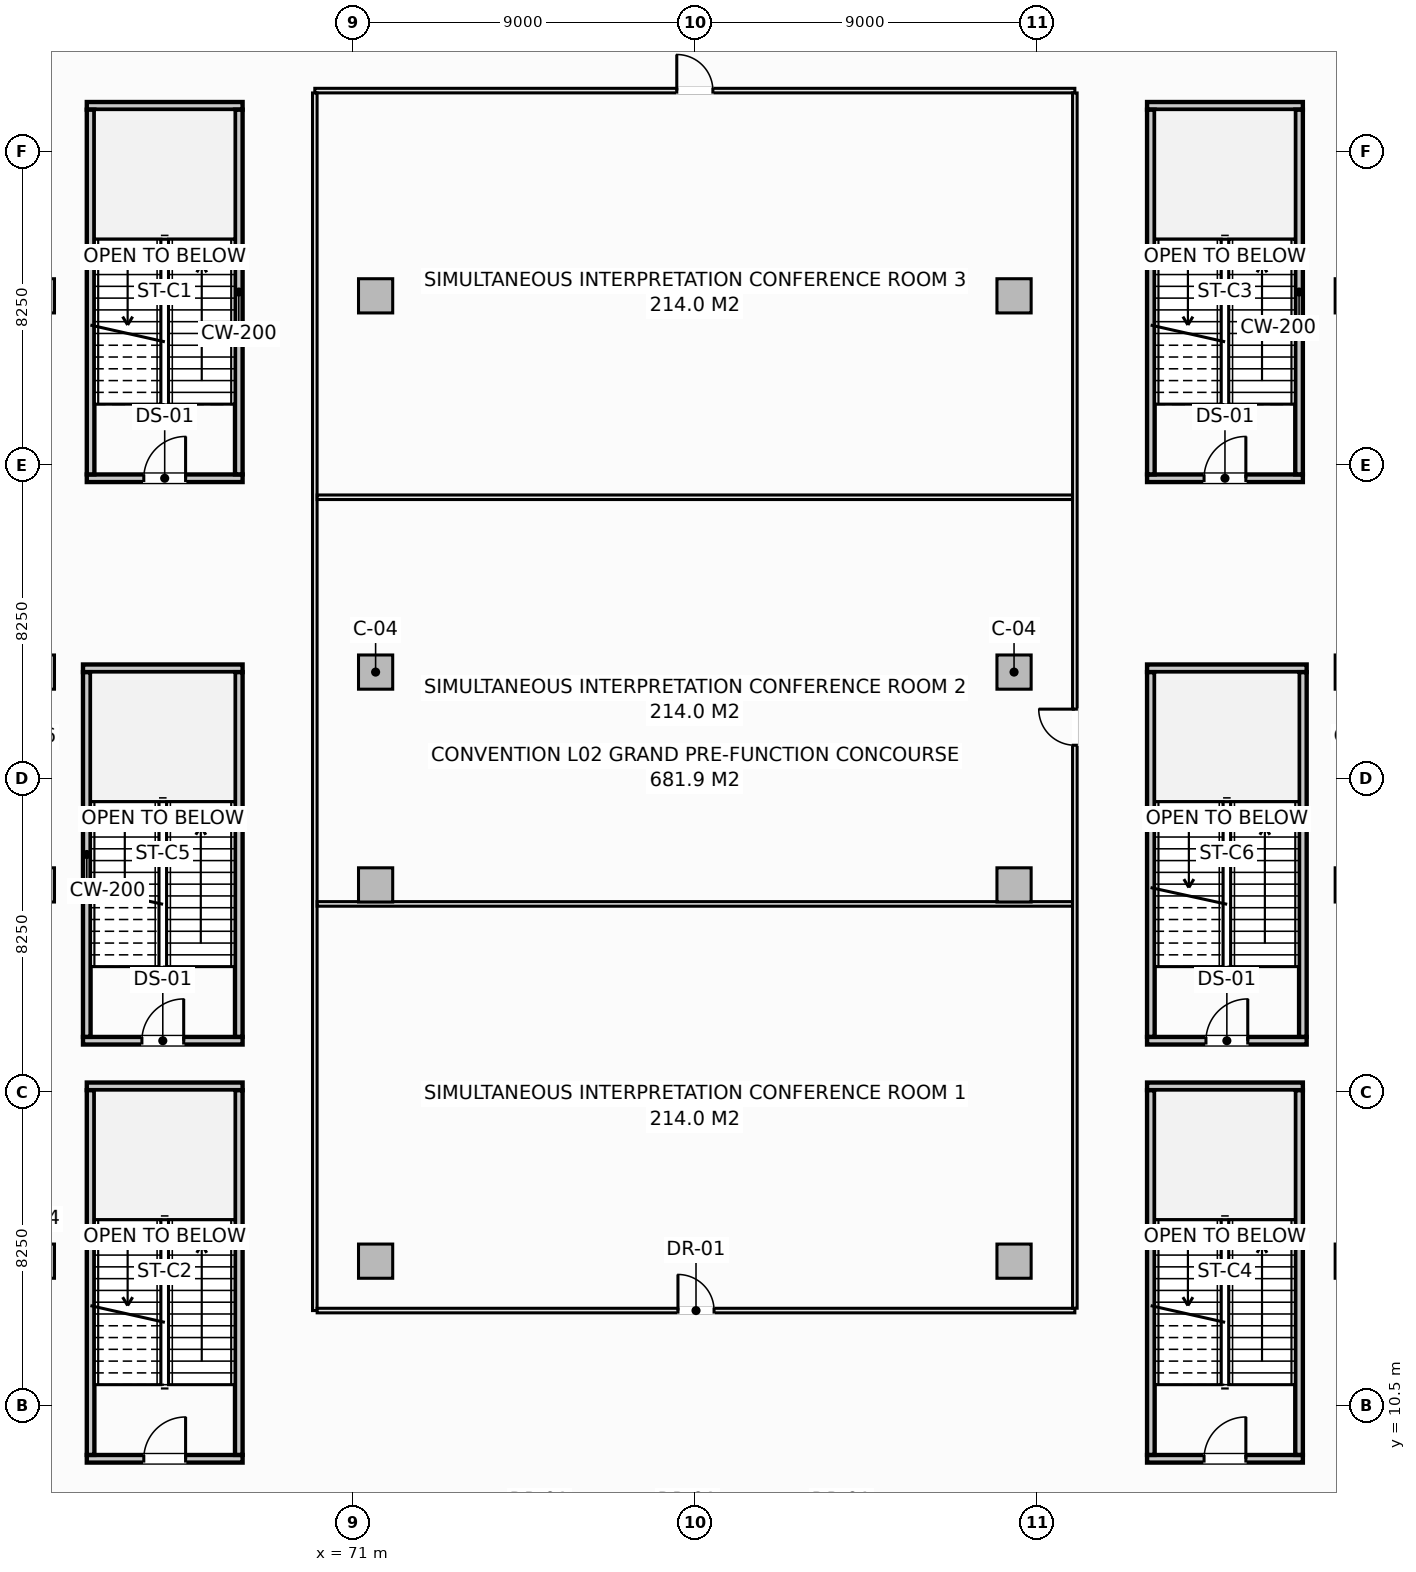
"""IFC4 building model, lengths in metres.
Left out: names, types, materials, properties, quantities, classifications, styles, units other than length and angle.
Written with IfcOpenShell. Run it as: python <this file> out.ifc"""

import sys

from ifc_helpers import new_model, si_unit, direction, frame, frame_2d, origin, origin_2d, place, context, subcontext, project, spatial, rectangle, extrude, element, fill, save


model = new_model("IFC4")
c1 = context("Model", 3, precision=1e-05, world=origin(), true_north=direction((0.0, 1.0)))
c2 = subcontext(c1, "Body", "Model", "MODEL_VIEW")
j1 = project(units=[si_unit("LENGTHUNIT", "METRE"), si_unit("PLANEANGLEUNIT", "RADIAN")], contexts=[c1])
p1 = place(None, origin())
s1 = spatial("IfcSite", under=j1, at=p1, CompositionType="ELEMENT")
p2 = place(p1, origin())
s2 = spatial("IfcBuilding", under=s1, at=p2, CompositionType="ELEMENT")
p3 = place(p2, frame((0.0, 0.0, 10.0)))
s3 = spatial("IfcBuildingStorey", under=s2, at=p3, CompositionType="ELEMENT", Elevation=10.0)
for number, where, z_axis, x_axis in (
    (1, (62.7, 14.3, -0.26), (0.0, 0.0, 1.0), (1.0, 0.0, 0.0)),
    (2, (62.7, 24.2, -0.26), (0.0, 0.0, 1.0), (1.0, 0.0, 0.0)),
    (3, (62.7, 29.8, -0.26), (0.0, 0.0, 1.0), (1.0, 0.0, 0.0)),
    (4, (62.7, 39.7, -0.26), (0.0, 0.0, 1.0), (1.0, 0.0, 0.0)),
    (5, (71.6, 14.3, -0.26), (0.0, 0.0, 1.0), (1.0, 0.0, 0.0)),
    (6, (71.6, 24.2, -0.26), (0.0, 0.0, 1.0), (1.0, 0.0, 0.0)),
    (7, (71.6, 29.8, -0.26), (0.0, 0.0, 1.0), (1.0, 0.0, 0.0)),
    (8, (71.6, 39.7, -0.26), (0.0, 0.0, 1.0), (1.0, 0.0, 0.0)),
    (9, (88.4, 14.3, -0.26), (0.0, 0.0, 1.0), (1.0, 0.0, 0.0)),
    (10, (88.4, 24.2, -0.26), (0.0, 0.0, 1.0), (1.0, 0.0, 0.0)),
    (11, (88.4, 29.8, -0.26), (0.0, 0.0, 1.0), (1.0, 0.0, 0.0)),
    (12, (88.4, 39.7, -0.26), (0.0, 0.0, 1.0), (1.0, 0.0, 0.0)),
    (13, (97.3, 14.3, -0.26), (0.0, 0.0, 1.0), (1.0, 0.0, 0.0)),
    (14, (97.3, 24.2, -0.26), (0.0, 0.0, 1.0), (1.0, 0.0, 0.0)),
    (15, (97.3, 29.8, -0.26), (0.0, 0.0, 1.0), (1.0, 0.0, 0.0)),
    (16, (97.3, 39.7, -0.26), (0.0, 0.0, 1.0), (1.0, 0.0, 0.0)),
):
    element("IfcColumn", number, at=place(p3, frame(where, z_axis=z_axis, x_axis=x_axis)), inside=s3, PredefinedType="COLUMN", context=c2, shape_type="SweptSolid", body=[
        extrude(rectangle(XDim=0.9, YDim=0.9, at=origin_2d()), origin(), (0.0, 0.0, 1.0), 5.02),
    ])
p4 = place(p3, frame((64.0, 34.9, -0.26), z_axis=(0.0, 0.0, 1.0), x_axis=(1.0, 0.0, 0.0)))
e17 = element("IfcWall", 17, at=p4, inside=s3, PredefinedType="SHEAR", context=c2, shape_type="SweptSolid", body=[
    extrude(rectangle(XDim=4.1, YDim=0.2, at=frame_2d((2.05, 0.0))), origin(), (0.0, 0.0, 1.0), 5.02),
])
p5 = place(p4, frame((1.5, 0.0, 0.26)))
e18 = element("IfcOpeningElement", 18, at=p5, cuts=e17, PredefinedType="OPENING", context=c2, shape_type="SweptSolid", body=[
    extrude(rectangle(XDim=1.1, YDim=2.15, at=frame_2d((0.55, 1.075))), frame((0.0, 0.11, 0.0), z_axis=(0.0, -1.0, 0.0), x_axis=(1.0, 0.0, 0.0)), (0.0, 0.0, 1.0), 0.22),
])
p6 = place(p3, frame((64.0, 44.7, -0.26), z_axis=(0.0, 0.0, 1.0), x_axis=(1.0, 0.0, 0.0)))
e19 = element("IfcWall", 19, at=p6, inside=s3, PredefinedType="SHEAR", context=c2, shape_type="SweptSolid", body=[
    extrude(rectangle(XDim=4.1, YDim=0.2, at=frame_2d((2.05, 0.0))), origin(), (0.0, 0.0, 1.0), 5.02),
])
for number, where, z_axis, x_axis in (
    (20, (64.1, 35.002, -0.26), (0.0, 0.0, 1.0), (0.0, 1.0, 0.0)),
    (21, (68.0, 35.002, -0.26), (0.0, 0.0, 1.0), (0.0, 1.0, 0.0)),
):
    element("IfcWall", number, at=place(p3, frame(where, z_axis=z_axis, x_axis=x_axis)), inside=s3, PredefinedType="SHEAR", context=c2, shape_type="SweptSolid", body=[
        extrude(rectangle(XDim=9.596, YDim=0.2, at=frame_2d((4.798, 0.0))), origin(), (0.0, 0.0, 1.0), 5.02),
    ])
p7 = place(p3, frame((64.0, 9.1, -0.26), z_axis=(0.0, 0.0, 1.0), x_axis=(1.0, 0.0, 0.0)))
e22 = element("IfcWall", 22, at=p7, inside=s3, PredefinedType="SHEAR", context=c2, shape_type="SweptSolid", body=[
    extrude(rectangle(XDim=4.1, YDim=0.2, at=frame_2d((2.05, 0.0))), origin(), (0.0, 0.0, 1.0), 5.02),
])
p8 = place(p7, frame((1.5, 0.0, 0.26)))
e23 = element("IfcOpeningElement", 23, at=p8, cuts=e22, PredefinedType="OPENING", context=c2, shape_type="SweptSolid", body=[
    extrude(rectangle(XDim=1.1, YDim=2.15, at=frame_2d((0.55, 1.075))), frame((0.0, 0.11, 0.0), z_axis=(0.0, -1.0, 0.0), x_axis=(1.0, 0.0, 0.0)), (0.0, 0.0, 1.0), 0.22),
])
p9 = place(p3, frame((64.0, 18.9, -0.26), z_axis=(0.0, 0.0, 1.0), x_axis=(1.0, 0.0, 0.0)))
e24 = element("IfcWall", 24, at=p9, inside=s3, PredefinedType="SHEAR", context=c2, shape_type="SweptSolid", body=[
    extrude(rectangle(XDim=4.1, YDim=0.2, at=frame_2d((2.05, 0.0))), origin(), (0.0, 0.0, 1.0), 5.02),
])
for number, where, z_axis, x_axis in (
    (25, (64.1, 9.202, -0.26), (0.0, 0.0, 1.0), (0.0, 1.0, 0.0)),
    (26, (68.0, 9.202, -0.26), (0.0, 0.0, 1.0), (0.0, 1.0, 0.0)),
):
    element("IfcWall", number, at=place(p3, frame(where, z_axis=z_axis, x_axis=x_axis)), inside=s3, PredefinedType="SHEAR", context=c2, shape_type="SweptSolid", body=[
        extrude(rectangle(XDim=9.596, YDim=0.2, at=frame_2d((4.798, 0.0))), origin(), (0.0, 0.0, 1.0), 5.02),
    ])
p10 = place(p3, frame((91.9, 34.9, -0.26), z_axis=(0.0, 0.0, 1.0), x_axis=(1.0, 0.0, 0.0)))
e27 = element("IfcWall", 27, at=p10, inside=s3, PredefinedType="SHEAR", context=c2, shape_type="SweptSolid", body=[
    extrude(rectangle(XDim=4.1, YDim=0.2, at=frame_2d((2.05, 0.0))), origin(), (0.0, 0.0, 1.0), 5.02),
])
p11 = place(p10, frame((1.5, 0.0, 0.26)))
e28 = element("IfcOpeningElement", 28, at=p11, cuts=e27, PredefinedType="OPENING", context=c2, shape_type="SweptSolid", body=[
    extrude(rectangle(XDim=1.1, YDim=2.15, at=frame_2d((0.55, 1.075))), frame((0.0, 0.11, 0.0), z_axis=(0.0, -1.0, 0.0), x_axis=(1.0, 0.0, 0.0)), (0.0, 0.0, 1.0), 0.22),
])
p12 = place(p3, frame((91.9, 44.7, -0.26), z_axis=(0.0, 0.0, 1.0), x_axis=(1.0, 0.0, 0.0)))
e29 = element("IfcWall", 29, at=p12, inside=s3, PredefinedType="SHEAR", context=c2, shape_type="SweptSolid", body=[
    extrude(rectangle(XDim=4.1, YDim=0.2, at=frame_2d((2.05, 0.0))), origin(), (0.0, 0.0, 1.0), 5.02),
])
for number, where, z_axis, x_axis in (
    (30, (92.0, 35.002, -0.26), (0.0, 0.0, 1.0), (0.0, 1.0, 0.0)),
    (31, (95.9, 35.002, -0.26), (0.0, 0.0, 1.0), (0.0, 1.0, 0.0)),
):
    element("IfcWall", number, at=place(p3, frame(where, z_axis=z_axis, x_axis=x_axis)), inside=s3, PredefinedType="SHEAR", context=c2, shape_type="SweptSolid", body=[
        extrude(rectangle(XDim=9.596, YDim=0.2, at=frame_2d((4.798, 0.0))), origin(), (0.0, 0.0, 1.0), 5.02),
    ])
p13 = place(p3, frame((91.9, 9.1, -0.26), z_axis=(0.0, 0.0, 1.0), x_axis=(1.0, 0.0, 0.0)))
e32 = element("IfcWall", 32, at=p13, inside=s3, PredefinedType="SHEAR", context=c2, shape_type="SweptSolid", body=[
    extrude(rectangle(XDim=4.1, YDim=0.2, at=frame_2d((2.05, 0.0))), origin(), (0.0, 0.0, 1.0), 5.02),
])
p14 = place(p13, frame((1.5, 0.0, 0.26)))
e33 = element("IfcOpeningElement", 33, at=p14, cuts=e32, PredefinedType="OPENING", context=c2, shape_type="SweptSolid", body=[
    extrude(rectangle(XDim=1.1, YDim=2.15, at=frame_2d((0.55, 1.075))), frame((0.0, 0.11, 0.0), z_axis=(0.0, -1.0, 0.0), x_axis=(1.0, 0.0, 0.0)), (0.0, 0.0, 1.0), 0.22),
])
p15 = place(p3, frame((91.9, 18.9, -0.26), z_axis=(0.0, 0.0, 1.0), x_axis=(1.0, 0.0, 0.0)))
e34 = element("IfcWall", 34, at=p15, inside=s3, PredefinedType="SHEAR", context=c2, shape_type="SweptSolid", body=[
    extrude(rectangle(XDim=4.1, YDim=0.2, at=frame_2d((2.05, 0.0))), origin(), (0.0, 0.0, 1.0), 5.02),
])
for number, where, z_axis, x_axis in (
    (35, (92.0, 9.202, -0.26), (0.0, 0.0, 1.0), (0.0, 1.0, 0.0)),
    (36, (95.9, 9.202, -0.26), (0.0, 0.0, 1.0), (0.0, 1.0, 0.0)),
):
    element("IfcWall", number, at=place(p3, frame(where, z_axis=z_axis, x_axis=x_axis)), inside=s3, PredefinedType="SHEAR", context=c2, shape_type="SweptSolid", body=[
        extrude(rectangle(XDim=9.596, YDim=0.2, at=frame_2d((4.798, 0.0))), origin(), (0.0, 0.0, 1.0), 5.02),
    ])
p16 = place(p3, frame((63.9, 20.1, -0.26), z_axis=(0.0, 0.0, 1.0), x_axis=(1.0, 0.0, 0.0)))
e37 = element("IfcWall", 37, at=p16, inside=s3, PredefinedType="SHEAR", context=c2, shape_type="SweptSolid", body=[
    extrude(rectangle(XDim=4.2, YDim=0.2, at=frame_2d((2.1, 0.0))), origin(), (0.0, 0.0, 1.0), 5.02),
])
p17 = place(p16, frame((1.55, 0.0, 0.26)))
e38 = element("IfcOpeningElement", 38, at=p17, cuts=e37, PredefinedType="OPENING", context=c2, shape_type="SweptSolid", body=[
    extrude(rectangle(XDim=1.1, YDim=2.15, at=frame_2d((0.55, 1.075))), frame((0.0, 0.11, 0.0), z_axis=(0.0, -1.0, 0.0), x_axis=(1.0, 0.0, 0.0)), (0.0, 0.0, 1.0), 0.22),
])
p18 = place(p3, frame((63.9, 29.9, -0.26), z_axis=(0.0, 0.0, 1.0), x_axis=(1.0, 0.0, 0.0)))
e39 = element("IfcWall", 39, at=p18, inside=s3, PredefinedType="SHEAR", context=c2, shape_type="SweptSolid", body=[
    extrude(rectangle(XDim=4.2, YDim=0.2, at=frame_2d((2.1, 0.0))), origin(), (0.0, 0.0, 1.0), 5.02),
])
for number, where, z_axis, x_axis in (
    (40, (64.0, 20.202, -0.26), (0.0, 0.0, 1.0), (0.0, 1.0, 0.0)),
    (41, (68.0, 20.202, -0.26), (0.0, 0.0, 1.0), (0.0, 1.0, 0.0)),
):
    element("IfcWall", number, at=place(p3, frame(where, z_axis=z_axis, x_axis=x_axis)), inside=s3, PredefinedType="SHEAR", context=c2, shape_type="SweptSolid", body=[
        extrude(rectangle(XDim=9.596, YDim=0.2, at=frame_2d((4.798, 0.0))), origin(), (0.0, 0.0, 1.0), 5.02),
    ])
p19 = place(p3, frame((91.9, 20.1, -0.26), z_axis=(0.0, 0.0, 1.0), x_axis=(1.0, 0.0, 0.0)))
e42 = element("IfcWall", 42, at=p19, inside=s3, PredefinedType="SHEAR", context=c2, shape_type="SweptSolid", body=[
    extrude(rectangle(XDim=4.2, YDim=0.2, at=frame_2d((2.1, 0.0))), origin(), (0.0, 0.0, 1.0), 5.02),
])
p20 = place(p19, frame((1.55, 0.0, 0.26)))
e43 = element("IfcOpeningElement", 43, at=p20, cuts=e42, PredefinedType="OPENING", context=c2, shape_type="SweptSolid", body=[
    extrude(rectangle(XDim=1.1, YDim=2.15, at=frame_2d((0.55, 1.075))), frame((0.0, 0.11, 0.0), z_axis=(0.0, -1.0, 0.0), x_axis=(1.0, 0.0, 0.0)), (0.0, 0.0, 1.0), 0.22),
])
p21 = place(p3, frame((91.9, 29.9, -0.26), z_axis=(0.0, 0.0, 1.0), x_axis=(1.0, 0.0, 0.0)))
e44 = element("IfcWall", 44, at=p21, inside=s3, PredefinedType="SHEAR", context=c2, shape_type="SweptSolid", body=[
    extrude(rectangle(XDim=4.2, YDim=0.2, at=frame_2d((2.1, 0.0))), origin(), (0.0, 0.0, 1.0), 5.02),
])
for number, where, z_axis, x_axis in (
    (45, (92.0, 20.202, -0.26), (0.0, 0.0, 1.0), (0.0, 1.0, 0.0)),
    (46, (96.0, 20.202, -0.26), (0.0, 0.0, 1.0), (0.0, 1.0, 0.0)),
):
    element("IfcWall", number, at=place(p3, frame(where, z_axis=z_axis, x_axis=x_axis)), inside=s3, PredefinedType="SHEAR", context=c2, shape_type="SweptSolid", body=[
        extrude(rectangle(XDim=9.596, YDim=0.2, at=frame_2d((4.798, 0.0))), origin(), (0.0, 0.0, 1.0), 5.02),
    ])
p22 = place(p3, frame((70.0, 45.1, 0.0), z_axis=(0.0, 0.0, 1.0), x_axis=(1.0, 0.0, 0.0)))
e47 = element("IfcWall", 47, at=p22, inside=s3, PredefinedType="PARTITIONING", context=c2, shape_type="SweptSolid", body=[
    extrude(rectangle(XDim=20.0, YDim=0.12, at=frame_2d((10.0, 0.0))), origin(), (0.0, 0.0, 1.0), 4.76),
])
p23 = place(p22, frame((9.525, 0.0, 0.0)))
e48 = element("IfcOpeningElement", 48, at=p23, cuts=e47, PredefinedType="OPENING", context=c2, shape_type="SweptSolid", body=[
    extrude(rectangle(XDim=0.95, YDim=2.1, at=frame_2d((0.475, 1.05))), frame((0.0, 0.07, 0.0), z_axis=(0.0, -1.0, 0.0), x_axis=(1.0, 0.0, 0.0)), (0.0, 0.0, 1.0), 0.14),
])
p24 = place(p3, frame((70.0, 13.0, 0.0), z_axis=(0.0, 0.0, 1.0), x_axis=(0.0, 1.0, 0.0)))
e49 = element("IfcWall", 49, at=p24, inside=s3, PredefinedType="PARTITIONING", context=c2, shape_type="SweptSolid", body=[
    extrude(rectangle(XDim=32.038, YDim=0.12, at=frame_2d((16.019, 0.0))), origin(), (0.0, 0.0, 1.0), 4.76),
])
p25 = place(p3, frame((70.062, 13.0, 0.0), z_axis=(0.0, 0.0, 1.0), x_axis=(1.0, 0.0, 0.0)))
e50 = element("IfcWall", 50, at=p25, inside=s3, PredefinedType="PARTITIONING", context=c2, shape_type="SweptSolid", body=[
    extrude(rectangle(XDim=19.938, YDim=0.12, at=frame_2d((9.969, 0.0))), origin(), (0.0, 0.0, 1.0), 4.76),
])
p26 = place(p25, frame((9.494, 0.0, 0.0)))
e51 = element("IfcOpeningElement", 51, at=p26, cuts=e50, PredefinedType="OPENING", context=c2, shape_type="SweptSolid", body=[
    extrude(rectangle(XDim=0.95, YDim=2.1, at=frame_2d((0.475, 1.05))), frame((0.0, 0.07, 0.0), z_axis=(0.0, -1.0, 0.0), x_axis=(1.0, 0.0, 0.0)), (0.0, 0.0, 1.0), 0.14),
])
p27 = place(p3, frame((90.0, 13.062, 0.0), z_axis=(0.0, 0.0, 1.0), x_axis=(0.0, 1.0, 0.0)))
e52 = element("IfcWall", 52, at=p27, inside=s3, PredefinedType="PARTITIONING", context=c2, shape_type="SweptSolid", body=[
    extrude(rectangle(XDim=31.976, YDim=0.12, at=frame_2d((15.988, 0.0))), origin(), (0.0, 0.0, 1.0), 4.76),
])
p28 = place(p27, frame((14.813, 0.0, 0.0)))
e53 = element("IfcOpeningElement", 53, at=p28, cuts=e52, PredefinedType="OPENING", context=c2, shape_type="SweptSolid", body=[
    extrude(rectangle(XDim=0.95, YDim=2.1, at=frame_2d((0.475, 1.05))), frame((0.0, 0.07, 0.0), z_axis=(0.0, -1.0, 0.0), x_axis=(1.0, 0.0, 0.0)), (0.0, 0.0, 1.0), 0.14),
])
for number, where, z_axis, x_axis in (
    (54, (70.062, 23.7, 0.0), (0.0, 0.0, 1.0), (1.0, 0.0, 0.0)),
    (55, (70.062, 34.4, 0.0), (0.0, 0.0, 1.0), (1.0, 0.0, 0.0)),
):
    element("IfcWall", number, at=place(p3, frame(where, z_axis=z_axis, x_axis=x_axis)), inside=s3, PredefinedType="PARTITIONING", context=c2, shape_type="SweptSolid", body=[
        extrude(rectangle(XDim=19.876, YDim=0.12, at=frame_2d((9.938, 0.0))), origin(), (0.0, 0.0, 1.0), 4.76),
    ])
p29 = place(p5, origin())
e56 = element("IfcDoor", 56, at=p29, inside=s3, OperationType="SINGLE_SWING_RIGHT", PredefinedType="DOOR", context=c2, shape_type="SweptSolid", body=[
    extrude(rectangle(XDim=1.1, YDim=2.15, at=frame_2d((0.55, 1.075))), frame((0.0, 0.025, 0.0), z_axis=(0.0, -1.0, 0.0), x_axis=(1.0, 0.0, 0.0)), (0.0, 0.0, 1.0), 0.05),
])
fill(e18, e56)
p30 = place(p8, origin())
e57 = element("IfcDoor", 57, at=p30, inside=s3, OperationType="SINGLE_SWING_RIGHT", PredefinedType="DOOR", context=c2, shape_type="SweptSolid", body=[
    extrude(rectangle(XDim=1.1, YDim=2.15, at=frame_2d((0.55, 1.075))), frame((0.0, 0.025, 0.0), z_axis=(0.0, -1.0, 0.0), x_axis=(1.0, 0.0, 0.0)), (0.0, 0.0, 1.0), 0.05),
])
fill(e23, e57)
p31 = place(p11, origin())
e58 = element("IfcDoor", 58, at=p31, inside=s3, OperationType="SINGLE_SWING_RIGHT", PredefinedType="DOOR", context=c2, shape_type="SweptSolid", body=[
    extrude(rectangle(XDim=1.1, YDim=2.15, at=frame_2d((0.55, 1.075))), frame((0.0, 0.025, 0.0), z_axis=(0.0, -1.0, 0.0), x_axis=(1.0, 0.0, 0.0)), (0.0, 0.0, 1.0), 0.05),
])
fill(e28, e58)
p32 = place(p14, origin())
e59 = element("IfcDoor", 59, at=p32, inside=s3, OperationType="SINGLE_SWING_RIGHT", PredefinedType="DOOR", context=c2, shape_type="SweptSolid", body=[
    extrude(rectangle(XDim=1.1, YDim=2.15, at=frame_2d((0.55, 1.075))), frame((0.0, 0.025, 0.0), z_axis=(0.0, -1.0, 0.0), x_axis=(1.0, 0.0, 0.0)), (0.0, 0.0, 1.0), 0.05),
])
fill(e33, e59)
p33 = place(p17, origin())
e60 = element("IfcDoor", 60, at=p33, inside=s3, OperationType="SINGLE_SWING_RIGHT", PredefinedType="DOOR", context=c2, shape_type="SweptSolid", body=[
    extrude(rectangle(XDim=1.1, YDim=2.15, at=frame_2d((0.55, 1.075))), frame((0.0, 0.025, 0.0), z_axis=(0.0, -1.0, 0.0), x_axis=(1.0, 0.0, 0.0)), (0.0, 0.0, 1.0), 0.05),
])
fill(e38, e60)
p34 = place(p20, origin())
e61 = element("IfcDoor", 61, at=p34, inside=s3, OperationType="SINGLE_SWING_RIGHT", PredefinedType="DOOR", context=c2, shape_type="SweptSolid", body=[
    extrude(rectangle(XDim=1.1, YDim=2.15, at=frame_2d((0.55, 1.075))), frame((0.0, 0.025, 0.0), z_axis=(0.0, -1.0, 0.0), x_axis=(1.0, 0.0, 0.0)), (0.0, 0.0, 1.0), 0.05),
])
fill(e43, e61)
p35 = place(p26, origin())
e62 = element("IfcDoor", 62, at=p35, inside=s3, OperationType="SINGLE_SWING_LEFT", PredefinedType="DOOR", context=c2, shape_type="SweptSolid", body=[
    extrude(rectangle(XDim=0.95, YDim=2.1, at=frame_2d((0.475, 1.05))), frame((0.0, 0.025, 0.0), z_axis=(0.0, -1.0, 0.0), x_axis=(1.0, 0.0, 0.0)), (0.0, 0.0, 1.0), 0.05),
])
fill(e51, e62)
p36 = place(p28, origin())
e63 = element("IfcDoor", 63, at=p36, inside=s3, OperationType="SINGLE_SWING_RIGHT", PredefinedType="DOOR", context=c2, shape_type="SweptSolid", body=[
    extrude(rectangle(XDim=0.95, YDim=2.1, at=frame_2d((0.475, 1.05))), frame((0.0, 0.025, 0.0), z_axis=(0.0, -1.0, 0.0), x_axis=(1.0, 0.0, 0.0)), (0.0, 0.0, 1.0), 0.05),
])
fill(e53, e63)
p37 = place(p23, origin())
e64 = element("IfcDoor", 64, at=p37, inside=s3, OperationType="SINGLE_SWING_LEFT", PredefinedType="DOOR", context=c2, shape_type="SweptSolid", body=[
    extrude(rectangle(XDim=0.95, YDim=2.1, at=frame_2d((0.475, 1.05))), frame((0.0, 0.025, 0.0), z_axis=(0.0, -1.0, 0.0), x_axis=(1.0, 0.0, 0.0)), (0.0, 0.0, 1.0), 0.05),
])
fill(e48, e64)
save(model, sys.argv[1])
